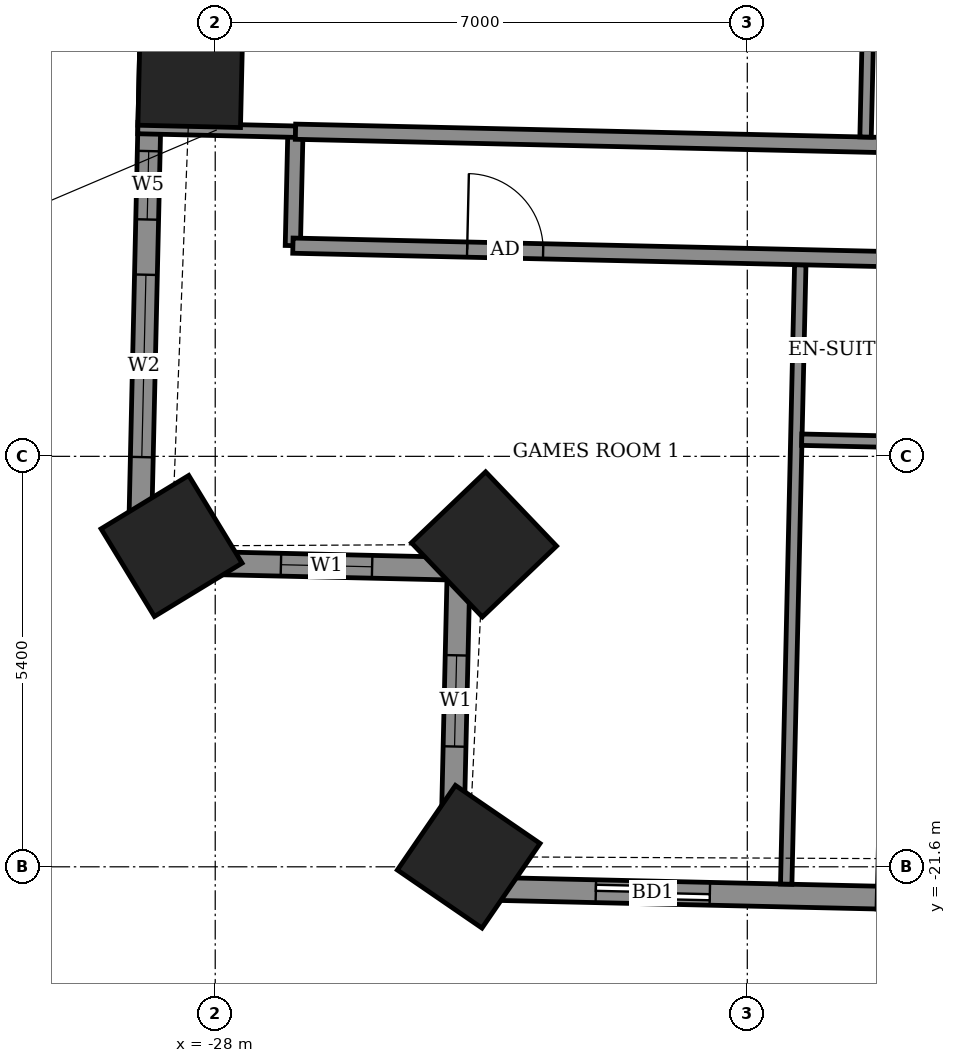
"""IFC4 building model, lengths in metres.
Left out: names, types, materials, properties, quantities, classifications, styles, units other than length and angle.
Written with IfcOpenShell. Run it as: python <this file> out.ifc"""

import sys

from ifc_helpers import new_model, si_unit, direction, frame, frame_2d, origin, origin_2d, place, context, subcontext, project, spatial, rectangle, extrude, element, fill, save


model = new_model("IFC4")
c1 = context("Model", 3, precision=1e-05, world=origin(), true_north=direction((0.0, 1.0)))
c2 = subcontext(c1, "Body", "Model", "MODEL_VIEW")
j1 = project(units=[si_unit("LENGTHUNIT", "METRE"), si_unit("PLANEANGLEUNIT", "RADIAN")], contexts=[c1])
p1 = place(None, origin())
s1 = spatial("IfcSite", under=j1, at=p1, CompositionType="ELEMENT")
p2 = place(p1, origin())
s2 = spatial("IfcBuilding", under=s1, at=p2, CompositionType="ELEMENT")
p3 = place(p2, frame((0.0, 0.0, 112.7)))
s3 = spatial("IfcBuildingStorey", under=s2, at=p3, CompositionType="ELEMENT", Elevation=112.7)
for number, where, z_axis, x_axis in (
    (1, (-28.327, -11.184, -0.55), (0.0, 0.0, 1.0), (-0.023, -1.0, 0.0)),
    (2, (-28.574, -17.379, -0.55), (0.0, 0.0, 1.0), (0.52, -0.854, 0.0)),
    (3, (-24.464, -17.359, -0.55), (0.0, 0.0, 1.0), (0.691, -0.723, 0.0)),
    (4, (-24.665, -21.467, -0.55), (0.0, 0.0, 1.0), (0.825, -0.566, 0.0)),
):
    element("IfcColumn", number, at=place(p3, frame(where, z_axis=z_axis, x_axis=x_axis)), inside=s3, PredefinedType="COLUMN", context=c2, shape_type="SweptSolid", body=[
        extrude(rectangle(XDim=1.35, YDim=1.35, at=origin_2d()), origin(), (0.0, 0.0, 1.0), 3.6),
    ])
p4 = place(p3, frame((-28.702, -4.557, 0.0), z_axis=(0.0, 0.0, 1.0), x_axis=(-0.022653729471, -0.999743371341, 0.0)))
e5 = element("IfcWall", 5, at=p4, inside=s3, PredefinedType="SOLIDWALL", context=c2, shape_type="SweptSolid", body=[
    extrude(rectangle(XDim=13.03, YDim=0.3, at=frame_2d((6.515, 0.0))), origin(), (0.0, 0.0, 1.0), 3.05),
])
p5 = place(p4, frame((2.586, 0.0, 0.0)))
e6 = element("IfcOpeningElement", 6, at=p5, cuts=e5, PredefinedType="OPENING", context=c2, shape_type="SweptSolid", body=[
    extrude(rectangle(XDim=1.5, YDim=2.4, at=frame_2d((0.75, 1.2))), frame((0.0, 0.16, 0.0), z_axis=(0.0, -1.0, 0.0), x_axis=(1.0, 0.0, 0.0)), (0.0, 0.0, 1.0), 0.32),
])
p6 = place(p4, frame((7.629, 0.0, 0.9)))
e7 = element("IfcOpeningElement", 7, at=p6, cuts=e5, PredefinedType="OPENING", context=c2, shape_type="SweptSolid", body=[
    extrude(rectangle(XDim=0.9, YDim=1.5, at=frame_2d((0.45, 0.75))), frame((0.0, 0.16, 0.0), z_axis=(0.0, -1.0, 0.0), x_axis=(1.0, 0.0, 0.0)), (0.0, 0.0, 1.0), 0.32),
])
p7 = place(p4, frame((9.256, 0.0, 0.9)))
e8 = element("IfcOpeningElement", 8, at=p7, cuts=e5, PredefinedType="OPENING", context=c2, shape_type="SweptSolid", body=[
    extrude(rectangle(XDim=2.4, YDim=1.5, at=frame_2d((1.2, 0.75))), frame((0.0, 0.16, 0.0), z_axis=(0.0, -1.0, 0.0), x_axis=(1.0, 0.0, 0.0)), (0.0, 0.0, 1.0), 0.32),
])
p8 = place(p3, frame((-28.997, -17.583, 0.0), z_axis=(0.0, 0.0, 1.0), x_axis=(0.999739037152, -0.022844202663, 0.0)))
e9 = element("IfcWall", 9, at=p8, inside=s3, PredefinedType="SOLIDWALL", context=c2, shape_type="SweptSolid", body=[
    extrude(rectangle(XDim=4.2, YDim=0.3, at=frame_2d((2.1, 0.0))), origin(), (0.0, 0.0, 1.0), 2.55),
])
p9 = place(p8, frame((1.862, 0.0, 0.9)))
e10 = element("IfcOpeningElement", 10, at=p9, cuts=e9, PredefinedType="OPENING", context=c2, shape_type="SweptSolid", body=[
    extrude(rectangle(XDim=1.2, YDim=1.5, at=frame_2d((0.6, 0.75))), frame((0.0, 0.16, 0.0), z_axis=(0.0, -1.0, 0.0), x_axis=(1.0, 0.0, 0.0)), (0.0, 0.0, 1.0), 0.32),
])
p10 = place(p3, frame((-24.798, -17.679, 0.0), z_axis=(0.0, 0.0, 1.0), x_axis=(-0.022844202663, -0.999739037152, 0.0)))
e11 = element("IfcWall", 11, at=p10, inside=s3, PredefinedType="SOLIDWALL", context=c2, shape_type="SweptSolid", body=[
    extrude(rectangle(XDim=4.2, YDim=0.3, at=frame_2d((2.1, 0.0))), origin(), (0.0, 0.0, 1.0), 2.55),
])
p11 = place(p10, frame((1.139, 0.0, 0.9)))
e12 = element("IfcOpeningElement", 12, at=p11, cuts=e11, PredefinedType="OPENING", context=c2, shape_type="SweptSolid", body=[
    extrude(rectangle(XDim=1.2, YDim=1.5, at=frame_2d((0.6, 0.75))), frame((0.0, 0.16, 0.0), z_axis=(0.0, -1.0, 0.0), x_axis=(1.0, 0.0, 0.0)), (0.0, 0.0, 1.0), 0.32),
])
p12 = place(p3, frame((-24.894, -21.878, 0.0), z_axis=(0.0, 0.0, 1.0), x_axis=(0.999742689045, -0.022683820265, 0.0)))
e13 = element("IfcWall", 13, at=p12, inside=s3, PredefinedType="SOLIDWALL", context=c2, shape_type="SweptSolid", body=[
    extrude(rectangle(XDim=44.708, YDim=0.3, at=frame_2d((22.354, 0.0))), origin(), (0.0, 0.0, 1.0), 3.05),
])
p13 = place(p12, frame((1.902, 0.0, 0.0)))
e14 = element("IfcOpeningElement", 14, at=p13, cuts=e13, PredefinedType="OPENING", context=c2, shape_type="SweptSolid", body=[
    extrude(rectangle(XDim=1.5, YDim=2.4, at=frame_2d((0.75, 1.2))), frame((0.0, 0.16, 0.0), z_axis=(0.0, -1.0, 0.0), x_axis=(1.0, 0.0, 0.0)), (0.0, 0.0, 1.0), 0.32),
])
p14 = place(p12, frame((7.178, 0.0, 0.0)))
e15 = element("IfcOpeningElement", 15, at=p14, cuts=e13, PredefinedType="OPENING", context=c2, shape_type="SweptSolid", body=[
    extrude(rectangle(XDim=1.2, YDim=2.4, at=frame_2d((0.6, 1.2))), frame((0.0, 0.16, 0.0), z_axis=(0.0, -1.0, 0.0), x_axis=(1.0, 0.0, 0.0)), (0.0, 0.0, 1.0), 0.32),
])
p15 = place(p12, frame((9.817, 0.0, 0.0)))
e16 = element("IfcOpeningElement", 16, at=p15, cuts=e13, PredefinedType="OPENING", context=c2, shape_type="SweptSolid", body=[
    extrude(rectangle(XDim=1.5, YDim=2.4, at=frame_2d((0.75, 1.2))), frame((0.0, 0.16, 0.0), z_axis=(0.0, -1.0, 0.0), x_axis=(1.0, 0.0, 0.0)), (0.0, 0.0, 1.0), 0.32),
])
p16 = place(p12, frame((14.9, 0.0, 0.0)))
e17 = element("IfcOpeningElement", 17, at=p16, cuts=e13, PredefinedType="OPENING", context=c2, shape_type="SweptSolid", body=[
    extrude(rectangle(XDim=1.5, YDim=2.4, at=frame_2d((0.75, 1.2))), frame((0.0, 0.16, 0.0), z_axis=(0.0, -1.0, 0.0), x_axis=(1.0, 0.0, 0.0)), (0.0, 0.0, 1.0), 0.32),
])
p17 = place(p12, frame((20.207, 0.0, 0.0)))
e18 = element("IfcOpeningElement", 18, at=p17, cuts=e13, PredefinedType="OPENING", context=c2, shape_type="SweptSolid", body=[
    extrude(rectangle(XDim=1.5, YDim=2.4, at=frame_2d((0.75, 1.2))), frame((0.0, 0.16, 0.0), z_axis=(0.0, -1.0, 0.0), x_axis=(1.0, 0.0, 0.0)), (0.0, 0.0, 1.0), 0.32),
])
p18 = place(p12, frame((22.997, 0.0, 0.0)))
e19 = element("IfcOpeningElement", 19, at=p18, cuts=e13, PredefinedType="OPENING", context=c2, shape_type="SweptSolid", body=[
    extrude(rectangle(XDim=1.5, YDim=2.4, at=frame_2d((0.75, 1.2))), frame((0.0, 0.16, 0.0), z_axis=(0.0, -1.0, 0.0), x_axis=(1.0, 0.0, 0.0)), (0.0, 0.0, 1.0), 0.32),
])
p19 = place(p12, frame((28.562, 0.0, 0.0)))
e20 = element("IfcOpeningElement", 20, at=p19, cuts=e13, PredefinedType="OPENING", context=c2, shape_type="SweptSolid", body=[
    extrude(rectangle(XDim=1.5, YDim=2.4, at=frame_2d((0.75, 1.2))), frame((0.0, 0.16, 0.0), z_axis=(0.0, -1.0, 0.0), x_axis=(1.0, 0.0, 0.0)), (0.0, 0.0, 1.0), 0.32),
])
p20 = place(p12, frame((33.512, 0.0, 0.0)))
e21 = element("IfcOpeningElement", 21, at=p20, cuts=e13, PredefinedType="OPENING", context=c2, shape_type="SweptSolid", body=[
    extrude(rectangle(XDim=1.5, YDim=2.4, at=frame_2d((0.75, 1.2))), frame((0.0, 0.16, 0.0), z_axis=(0.0, -1.0, 0.0), x_axis=(1.0, 0.0, 0.0)), (0.0, 0.0, 1.0), 0.32),
])
p21 = place(p12, frame((36.452, 0.0, 0.0)))
e22 = element("IfcOpeningElement", 22, at=p21, cuts=e13, PredefinedType="OPENING", context=c2, shape_type="SweptSolid", body=[
    extrude(rectangle(XDim=1.2, YDim=2.4, at=frame_2d((0.6, 1.2))), frame((0.0, 0.16, 0.0), z_axis=(0.0, -1.0, 0.0), x_axis=(1.0, 0.0, 0.0)), (0.0, 0.0, 1.0), 0.32),
])
p22 = place(p12, frame((40.923, 0.0, 0.9)))
e23 = element("IfcOpeningElement", 23, at=p22, cuts=e13, PredefinedType="OPENING", context=c2, shape_type="SweptSolid", body=[
    extrude(rectangle(XDim=2.4, YDim=1.5, at=frame_2d((1.2, 0.75))), frame((0.0, 0.16, 0.0), z_axis=(0.0, -1.0, 0.0), x_axis=(1.0, 0.0, 0.0)), (0.0, 0.0, 1.0), 0.32),
])
p23 = place(p3, frame((-20.488, -21.828, 0.0), z_axis=(0.0, 0.0, 1.0), x_axis=(0.022706435224, 0.999742175663, 0.0)))
e24 = element("IfcWall", 24, at=p23, inside=s3, PredefinedType="PARTITIONING", context=c2, shape_type="SweptSolid", body=[
    extrude(rectangle(XDim=8.15, YDim=0.15, at=frame_2d((4.075, 0.0))), origin(), (0.0, 0.0, 1.0), 2.55),
])
p24 = place(p3, frame((-20.284, -15.981, 0.0), z_axis=(0.0, 0.0, 1.0), x_axis=(0.999749954681, -0.022361308448, 0.0)))
e25 = element("IfcWall", 25, at=p24, inside=s3, PredefinedType="PARTITIONING", context=c2, shape_type="SweptSolid", body=[
    extrude(rectangle(XDim=2.325, YDim=0.15, at=frame_2d((1.163, 0.0))), origin(), (0.0, 0.0, 1.0), 3.05),
])
p25 = place(p3, frame((-26.979, -13.428, 0.0), z_axis=(0.0, 0.0, 1.0), x_axis=(0.022617910375, 0.999744182344, 0.0)))
e26 = element("IfcWall", 26, at=p25, inside=s3, PredefinedType="PARTITIONING", context=c2, shape_type="SweptSolid", body=[
    extrude(rectangle(XDim=1.5, YDim=0.2, at=frame_2d((0.75, 0.0))), origin(), (0.0, 0.0, 1.0), 3.05),
])
p26 = place(p3, frame((-26.978, -13.428, 0.0), z_axis=(0.0, 0.0, 1.0), x_axis=(0.999742553034, -0.02268981385, 0.0)))
e27 = element("IfcWall", 27, at=p26, inside=s3, PredefinedType="PARTITIONING", context=c2, shape_type="SweptSolid", body=[
    extrude(rectangle(XDim=50.733, YDim=0.2, at=frame_2d((25.366, 0.0))), origin(), (0.0, 0.0, 1.0), 3.05),
])
p27 = place(p26, frame((2.293, 0.0, 0.0)))
e28 = element("IfcOpeningElement", 28, at=p27, cuts=e27, PredefinedType="OPENING", context=c2, shape_type="SweptSolid", body=[
    extrude(rectangle(XDim=1.0, YDim=2.1, at=frame_2d((0.5, 1.05))), frame((0.0, 0.11, 0.0), z_axis=(0.0, -1.0, 0.0), x_axis=(1.0, 0.0, 0.0)), (0.0, 0.0, 1.0), 0.22),
])
p28 = place(p26, frame((9.65, 0.0, 0.0)))
e29 = element("IfcOpeningElement", 29, at=p28, cuts=e27, PredefinedType="OPENING", context=c2, shape_type="SweptSolid", body=[
    extrude(rectangle(XDim=0.9, YDim=2.1, at=frame_2d((0.45, 1.05))), frame((0.0, 0.11, 0.0), z_axis=(0.0, -1.0, 0.0), x_axis=(1.0, 0.0, 0.0)), (0.0, 0.0, 1.0), 0.22),
])
p29 = place(p26, frame((11.75, 0.0, 0.0)))
e30 = element("IfcOpeningElement", 30, at=p29, cuts=e27, PredefinedType="OPENING", context=c2, shape_type="SweptSolid", body=[
    extrude(rectangle(XDim=0.9, YDim=2.1, at=frame_2d((0.45, 1.05))), frame((0.0, 0.11, 0.0), z_axis=(0.0, -1.0, 0.0), x_axis=(1.0, 0.0, 0.0)), (0.0, 0.0, 1.0), 0.22),
])
p30 = place(p26, frame((18.675, 0.0, 0.0)))
e31 = element("IfcOpeningElement", 31, at=p30, cuts=e27, PredefinedType="OPENING", context=c2, shape_type="SweptSolid", body=[
    extrude(rectangle(XDim=0.9, YDim=2.1, at=frame_2d((0.45, 1.05))), frame((0.0, 0.11, 0.0), z_axis=(0.0, -1.0, 0.0), x_axis=(1.0, 0.0, 0.0)), (0.0, 0.0, 1.0), 0.22),
])
p31 = place(p26, frame((20.75, 0.0, 0.0)))
e32 = element("IfcOpeningElement", 32, at=p31, cuts=e27, PredefinedType="OPENING", context=c2, shape_type="SweptSolid", body=[
    extrude(rectangle(XDim=0.9, YDim=2.1, at=frame_2d((0.45, 1.05))), frame((0.0, 0.11, 0.0), z_axis=(0.0, -1.0, 0.0), x_axis=(1.0, 0.0, 0.0)), (0.0, 0.0, 1.0), 0.22),
])
p32 = place(p26, frame((27.725, 0.0, 0.0)))
e33 = element("IfcOpeningElement", 33, at=p32, cuts=e27, PredefinedType="OPENING", context=c2, shape_type="SweptSolid", body=[
    extrude(rectangle(XDim=0.9, YDim=2.1, at=frame_2d((0.45, 1.05))), frame((0.0, 0.11, 0.0), z_axis=(0.0, -1.0, 0.0), x_axis=(1.0, 0.0, 0.0)), (0.0, 0.0, 1.0), 0.22),
])
p33 = place(p26, frame((30.025, 0.0, 0.0)))
e34 = element("IfcOpeningElement", 34, at=p33, cuts=e27, PredefinedType="OPENING", context=c2, shape_type="SweptSolid", body=[
    extrude(rectangle(XDim=0.9, YDim=2.1, at=frame_2d((0.45, 1.05))), frame((0.0, 0.11, 0.0), z_axis=(0.0, -1.0, 0.0), x_axis=(1.0, 0.0, 0.0)), (0.0, 0.0, 1.0), 0.22),
])
p34 = place(p26, frame((36.95, 0.0, 0.0)))
e35 = element("IfcOpeningElement", 35, at=p34, cuts=e27, PredefinedType="OPENING", context=c2, shape_type="SweptSolid", body=[
    extrude(rectangle(XDim=0.9, YDim=2.1, at=frame_2d((0.45, 1.05))), frame((0.0, 0.11, 0.0), z_axis=(0.0, -1.0, 0.0), x_axis=(1.0, 0.0, 0.0)), (0.0, 0.0, 1.0), 0.22),
])
p35 = place(p26, frame((38.95, 0.0, 0.0)))
e36 = element("IfcOpeningElement", 36, at=p35, cuts=e27, PredefinedType="OPENING", context=c2, shape_type="SweptSolid", body=[
    extrude(rectangle(XDim=0.9, YDim=2.1, at=frame_2d((0.45, 1.05))), frame((0.0, 0.11, 0.0), z_axis=(0.0, -1.0, 0.0), x_axis=(1.0, 0.0, 0.0)), (0.0, 0.0, 1.0), 0.22),
])
p36 = place(p26, frame((48.179, 0.0, 0.0)))
e37 = element("IfcOpeningElement", 37, at=p36, cuts=e27, PredefinedType="OPENING", context=c2, shape_type="SweptSolid", body=[
    extrude(rectangle(XDim=1.0, YDim=2.1, at=frame_2d((0.5, 1.05))), frame((0.0, 0.11, 0.0), z_axis=(0.0, -1.0, 0.0), x_axis=(1.0, 0.0, 0.0)), (0.0, 0.0, 1.0), 0.22),
])
p37 = place(p26, frame((43.575, 0.0, 0.0)))
e38 = element("IfcOpeningElement", 38, at=p37, cuts=e27, PredefinedType="OPENING", context=c2, shape_type="SweptSolid", body=[
    extrude(rectangle(XDim=0.9, YDim=2.1, at=frame_2d((0.45, 1.05))), frame((0.0, 0.11, 0.0), z_axis=(0.0, -1.0, 0.0), x_axis=(1.0, 0.0, 0.0)), (0.0, 0.0, 1.0), 0.22),
])
p38 = place(p3, frame((-29.018, -11.881, 0.0), z_axis=(0.0, 0.0, 1.0), x_axis=(0.999734999765, -0.02302021381, 0.0)))
e39 = element("IfcWall", 39, at=p38, inside=s3, PredefinedType="PARTITIONING", context=c2, shape_type="SweptSolid", body=[
    extrude(rectangle(XDim=2.079, YDim=0.15, at=frame_2d((1.039, 0.0))), origin(), (0.0, 0.0, 1.0), 2.55),
])
p39 = place(p3, frame((-26.944, -11.929, 0.0), z_axis=(0.0, 0.0, 1.0), x_axis=(0.999742757425, -0.022680806356, 0.0)))
e40 = element("IfcWall", 40, at=p39, inside=s3, PredefinedType="PARTITIONING", context=c2, shape_type="SweptSolid", body=[
    extrude(rectangle(XDim=9.698, YDim=0.2, at=frame_2d((4.849, 0.0))), origin(), (0.0, 0.0, 1.0), 3.05),
])
p40 = place(p3, frame((-19.444, -11.999, 0.0), z_axis=(0.0, 0.0, 1.0), x_axis=(0.022603288534, 0.999744513037, 0.0)))
e41 = element("IfcWall", 41, at=p40, inside=s3, PredefinedType="PARTITIONING", context=c2, shape_type="SweptSolid", body=[
    extrude(rectangle(XDim=2.301, YDim=0.15, at=frame_2d((1.15, 0.0))), origin(), (0.0, 0.0, 1.0), 3.05),
])
p41 = place(p6, origin())
e42 = element("IfcWindow", 42, at=p41, inside=s3, PartitioningType="SINGLE_PANEL", PredefinedType="WINDOW", context=c2, shape_type="SweptSolid", body=[
    extrude(rectangle(XDim=0.9, YDim=1.5, at=frame_2d((0.45, 0.75))), frame((0.0, 0.03, 0.0), z_axis=(0.0, -1.0, 0.0), x_axis=(1.0, 0.0, 0.0)), (0.0, 0.0, 1.0), 0.06),
])
fill(e7, e42)
p42 = place(p7, origin())
e43 = element("IfcWindow", 43, at=p42, inside=s3, PartitioningType="DOUBLE_PANEL_VERTICAL", PredefinedType="WINDOW", context=c2, shape_type="SweptSolid", body=[
    extrude(rectangle(XDim=2.4, YDim=1.5, at=frame_2d((1.2, 0.75))), frame((0.0, 0.03, 0.0), z_axis=(0.0, -1.0, 0.0), x_axis=(1.0, 0.0, 0.0)), (0.0, 0.0, 1.0), 0.06),
])
fill(e8, e43)
p43 = place(p9, origin())
e44 = element("IfcWindow", 44, at=p43, inside=s3, PartitioningType="SINGLE_PANEL", PredefinedType="WINDOW", context=c2, shape_type="SweptSolid", body=[
    extrude(rectangle(XDim=1.2, YDim=1.5, at=frame_2d((0.6, 0.75))), frame((0.0, 0.03, 0.0), z_axis=(0.0, -1.0, 0.0), x_axis=(1.0, 0.0, 0.0)), (0.0, 0.0, 1.0), 0.06),
])
fill(e10, e44)
p44 = place(p11, origin())
e45 = element("IfcWindow", 45, at=p44, inside=s3, PartitioningType="SINGLE_PANEL", PredefinedType="WINDOW", context=c2, shape_type="SweptSolid", body=[
    extrude(rectangle(XDim=1.2, YDim=1.5, at=frame_2d((0.6, 0.75))), frame((0.0, 0.03, 0.0), z_axis=(0.0, -1.0, 0.0), x_axis=(1.0, 0.0, 0.0)), (0.0, 0.0, 1.0), 0.06),
])
fill(e12, e45)
p45 = place(p13, origin())
e46 = element("IfcDoor", 46, at=p45, inside=s3, OperationType="SLIDING_TO_LEFT", PredefinedType="DOOR", context=c2, shape_type="SweptSolid", body=[
    extrude(rectangle(XDim=1.5, YDim=2.4, at=frame_2d((0.75, 1.2))), frame((0.0, 0.025, 0.0), z_axis=(0.0, -1.0, 0.0), x_axis=(1.0, 0.0, 0.0)), (0.0, 0.0, 1.0), 0.05),
])
fill(e14, e46)
p46 = place(p27, origin())
e47 = element("IfcDoor", 47, at=p46, inside=s3, OperationType="SINGLE_SWING_LEFT", PredefinedType="DOOR", context=c2, shape_type="SweptSolid", body=[
    extrude(rectangle(XDim=1.0, YDim=2.1, at=frame_2d((0.5, 1.05))), frame((0.0, 0.025, 0.0), z_axis=(0.0, -1.0, 0.0), x_axis=(1.0, 0.0, 0.0)), (0.0, 0.0, 1.0), 0.05),
])
fill(e28, e47)
save(model, sys.argv[1])
